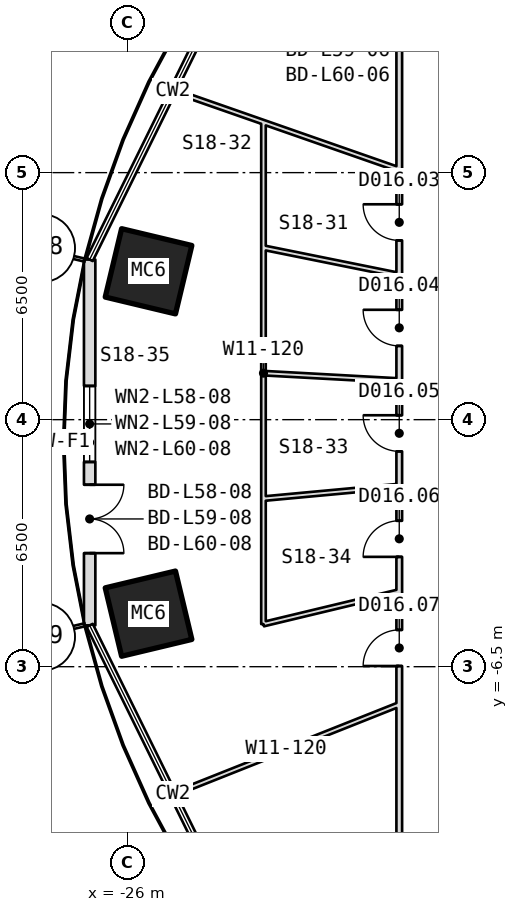
"""IFC4 building model, lengths in metres.
Left out: names, types, materials, properties, quantities, classifications, styles, units other than length and angle.
Written with IfcOpenShell. Run it as: python <this file> out.ifc"""

import sys

from ifc_helpers import new_model, si_unit, direction, frame, frame_2d, origin, origin_2d, place, context, subcontext, project, spatial, rectangle, hollow_rectangle, extrude, element, fill, save


model = new_model("IFC4")
c1 = context("Model", 3, precision=1e-05, world=origin(), true_north=direction((0.0, 1.0)))
c2 = subcontext(c1, "Body", "Model", "MODEL_VIEW")
j1 = project(units=[si_unit("LENGTHUNIT", "METRE"), si_unit("PLANEANGLEUNIT", "RADIAN")], contexts=[c1])
p1 = place(None, origin())
s1 = spatial("IfcSite", under=j1, at=p1, CompositionType="ELEMENT")
p2 = place(p1, origin())
s2 = spatial("IfcBuilding", under=s1, at=p2, CompositionType="ELEMENT")
p3 = place(p2, frame((0.0, 0.0, 260.65)))
s3 = spatial("IfcBuildingStorey", under=s2, at=p3, CompositionType="ELEMENT", Elevation=260.65)
for number, where, z_axis, x_axis in (
    (1, (-25.447, 3.904, -0.18), (0.0, 0.0, 1.0), (0.233, 0.973, 0.0)),
    (2, (-25.447, -5.104, -0.18), (0.0, 0.0, 1.0), (-0.233, 0.973, 0.0)),
):
    element("IfcColumn", number, at=place(p3, frame(where, z_axis=z_axis, x_axis=x_axis)), inside=s3, PredefinedType="COLUMN", context=c2, shape_type="SweptSolid", body=[
        extrude(hollow_rectangle(XDim=1.85, YDim=1.9, WallThickness=0.065, at=origin_2d()), origin(), (0.0, 0.0, 1.0), 4.15),
    ])
p4 = place(p3, frame((-26.997, 4.212, 0.0), z_axis=(0.0, 0.0, 1.0), x_axis=(0.0, -1.0, 0.0)))
e3 = element("IfcWall", 3, at=p4, inside=s3, PredefinedType="SOLIDWALL", context=c2, shape_type="SweptSolid", body=[
    extrude(rectangle(XDim=9.625, YDim=0.3, at=frame_2d((4.812, 0.0))), origin(), (0.0, 0.0, 1.0), 3.97),
])
p5 = place(p4, frame((5.925, 0.0, 0.0)))
e4 = element("IfcOpeningElement", 4, at=p5, cuts=e3, PredefinedType="OPENING", context=c2, shape_type="SweptSolid", body=[
    extrude(rectangle(XDim=1.8, YDim=2.4, at=frame_2d((0.9, 1.2))), frame((0.0, 0.16, 0.0), z_axis=(0.0, -1.0, 0.0), x_axis=(1.0, 0.0, 0.0)), (0.0, 0.0, 1.0), 0.32),
])
p6 = place(p4, frame((3.325, 0.0, 0.9)))
e5 = element("IfcOpeningElement", 5, at=p6, cuts=e3, PredefinedType="OPENING", context=c2, shape_type="SweptSolid", body=[
    extrude(rectangle(XDim=2.0, YDim=1.5, at=frame_2d((1.0, 0.75))), frame((0.0, 0.16, 0.0), z_axis=(0.0, -1.0, 0.0), x_axis=(1.0, 0.0, 0.0)), (0.0, 0.0, 1.0), 0.32),
])
p7 = place(p3, frame((-22.423, -5.379, 0.0), z_axis=(0.0, 0.0, 1.0), x_axis=(0.972404790941, 0.233300069769, 0.0)))
e6 = element("IfcWall", 6, at=p7, inside=s3, PredefinedType="PARTITIONING", context=c2, shape_type="SweptSolid", body=[
    extrude(rectangle(XDim=3.674, YDim=0.12, at=frame_2d((1.837, 0.0))), origin(), (0.0, 0.0, 1.0), 3.97),
])
p8 = place(p3, frame((-22.423, -2.078, 0.0), z_axis=(0.0, 0.0, 1.0), x_axis=(0.995734425091, 0.092265674486, 0.0)))
e7 = element("IfcWall", 7, at=p8, inside=s3, PredefinedType="PARTITIONING", context=c2, shape_type="SweptSolid", body=[
    extrude(rectangle(XDim=3.588, YDim=0.12, at=frame_2d((1.794, 0.0))), origin(), (0.0, 0.0, 1.0), 3.97),
])
p9 = place(p3, frame((-22.423, 1.224, 0.0), z_axis=(0.0, 0.0, 1.0), x_axis=(0.998512805401, -0.054517680164, 0.0)))
e8 = element("IfcWall", 8, at=p9, inside=s3, PredefinedType="PARTITIONING", context=c2, shape_type="SweptSolid", body=[
    extrude(rectangle(XDim=3.578, YDim=0.12, at=frame_2d((1.789, 0.0))), origin(), (0.0, 0.0, 1.0), 3.97),
])
p10 = place(p3, frame((-22.423, 4.526, 0.0), z_axis=(0.0, 0.0, 1.0), x_axis=(0.980228738347, -0.19786768437, 0.0)))
e9 = element("IfcWall", 9, at=p10, inside=s3, PredefinedType="PARTITIONING", context=c2, shape_type="SweptSolid", body=[
    extrude(rectangle(XDim=3.645, YDim=0.12, at=frame_2d((1.822, 0.0))), origin(), (0.0, 0.0, 1.0), 3.97),
])
p11 = place(p3, frame((-22.423, 7.827, 0.0), z_axis=(0.0, 0.0, 1.0), x_axis=(0.0, -1.0, 0.0)))
e10 = element("IfcWall", 10, at=p11, inside=s3, PredefinedType="PARTITIONING", context=c2, shape_type="SweptSolid", body=[
    extrude(rectangle(XDim=13.207, YDim=0.12, at=frame_2d((6.603, 0.0))), origin(), (0.0, 0.0, 1.0), 3.97),
])
p12 = place(p3, frame((-18.85, -16.15, 0.0), z_axis=(0.0, 0.0, 1.0), x_axis=(0.0, 1.0, 0.0)))
e11 = element("IfcWall", 11, at=p12, inside=s3, PredefinedType="PARTITIONING", context=c2, shape_type="SweptSolid", body=[
    extrude(rectangle(XDim=30.73, YDim=0.15, at=frame_2d((15.365, 0.0))), origin(), (0.0, 0.0, 1.0), 3.97),
])
p13 = place(p12, frame((20.867, 0.0, 0.0)))
e12 = element("IfcOpeningElement", 12, at=p13, cuts=e11, PredefinedType="OPENING", context=c2, shape_type="SweptSolid", body=[
    extrude(rectangle(XDim=0.95, YDim=2.1, at=frame_2d((0.475, 1.05))), frame((0.0, 0.085, 0.0), z_axis=(0.0, -1.0, 0.0), x_axis=(1.0, 0.0, 0.0)), (0.0, 0.0, 1.0), 0.17),
])
p14 = place(p12, frame((18.091, 0.0, 0.0)))
e13 = element("IfcOpeningElement", 13, at=p14, cuts=e11, PredefinedType="OPENING", context=c2, shape_type="SweptSolid", body=[
    extrude(rectangle(XDim=0.95, YDim=2.1, at=frame_2d((0.475, 1.05))), frame((0.0, 0.085, 0.0), z_axis=(0.0, -1.0, 0.0), x_axis=(1.0, 0.0, 0.0)), (0.0, 0.0, 1.0), 0.17),
])
p15 = place(p12, frame((15.316, 0.0, 0.0)))
e14 = element("IfcOpeningElement", 14, at=p15, cuts=e11, PredefinedType="OPENING", context=c2, shape_type="SweptSolid", body=[
    extrude(rectangle(XDim=0.95, YDim=2.1, at=frame_2d((0.475, 1.05))), frame((0.0, 0.085, 0.0), z_axis=(0.0, -1.0, 0.0), x_axis=(1.0, 0.0, 0.0)), (0.0, 0.0, 1.0), 0.17),
])
p16 = place(p12, frame((12.54, 0.0, 0.0)))
e15 = element("IfcOpeningElement", 15, at=p16, cuts=e11, PredefinedType="OPENING", context=c2, shape_type="SweptSolid", body=[
    extrude(rectangle(XDim=0.95, YDim=2.1, at=frame_2d((0.475, 1.05))), frame((0.0, 0.085, 0.0), z_axis=(0.0, -1.0, 0.0), x_axis=(1.0, 0.0, 0.0)), (0.0, 0.0, 1.0), 0.17),
])
p17 = place(p12, frame((9.668, 0.0, 0.0)))
e16 = element("IfcOpeningElement", 16, at=p17, cuts=e11, PredefinedType="OPENING", context=c2, shape_type="SweptSolid", body=[
    extrude(rectangle(XDim=0.95, YDim=2.1, at=frame_2d((0.475, 1.05))), frame((0.0, 0.085, 0.0), z_axis=(0.0, -1.0, 0.0), x_axis=(1.0, 0.0, 0.0)), (0.0, 0.0, 1.0), 0.17),
])
p18 = place(p3, frame((-18.85, -7.492, 0.0), z_axis=(0.0, 0.0, 1.0), x_axis=(-0.929289035648, -0.369353337908, 0.0)))
e17 = element("IfcWall", 17, at=p18, inside=s3, PredefinedType="PARTITIONING", context=c2, shape_type="SweptSolid", body=[
    extrude(rectangle(XDim=6.408, YDim=0.12, at=frame_2d((3.204, 0.0))), origin(), (0.0, 0.0, 1.0), 3.97),
])
p19 = place(p3, frame((-18.85, 6.58, 0.0), z_axis=(0.0, 0.0, 1.0), x_axis=(-0.944129608836, 0.329574394819, 0.0)))
e18 = element("IfcWall", 18, at=p19, inside=s3, PredefinedType="PARTITIONING", context=c2, shape_type="SweptSolid", body=[
    extrude(rectangle(XDim=6.307, YDim=0.12, at=frame_2d((3.153, 0.0))), origin(), (0.0, 0.0, 1.0), 3.97),
])
p20 = place(p5, origin())
e19 = element("IfcDoor", 19, at=p20, inside=s3, OperationType="SINGLE_SWING_LEFT", PredefinedType="DOOR", context=c2, shape_type="SweptSolid", body=[
    extrude(rectangle(XDim=1.8, YDim=2.4, at=frame_2d((0.9, 1.2))), frame((0.0, 0.025, 0.0), z_axis=(0.0, -1.0, 0.0), x_axis=(1.0, 0.0, 0.0)), (0.0, 0.0, 1.0), 0.05),
])
fill(e4, e19)
p21 = place(p6, origin())
e20 = element("IfcWindow", 20, at=p21, inside=s3, PartitioningType="SINGLE_PANEL", PredefinedType="WINDOW", context=c2, shape_type="SweptSolid", body=[
    extrude(rectangle(XDim=2.0, YDim=1.5, at=frame_2d((1.0, 0.75))), frame((0.0, 0.03, 0.0), z_axis=(0.0, -1.0, 0.0), x_axis=(1.0, 0.0, 0.0)), (0.0, 0.0, 1.0), 0.06),
])
fill(e5, e20)
p22 = place(p13, origin())
e21 = element("IfcDoor", 21, at=p22, inside=s3, OperationType="SINGLE_SWING_RIGHT", PredefinedType="DOOR", context=c2, shape_type="SweptSolid", body=[
    extrude(rectangle(XDim=0.95, YDim=2.1, at=frame_2d((0.475, 1.05))), frame((0.0, 0.025, 0.0), z_axis=(0.0, -1.0, 0.0), x_axis=(1.0, 0.0, 0.0)), (0.0, 0.0, 1.0), 0.05),
])
fill(e12, e21)
p23 = place(p14, origin())
e22 = element("IfcDoor", 22, at=p23, inside=s3, OperationType="SINGLE_SWING_RIGHT", PredefinedType="DOOR", context=c2, shape_type="SweptSolid", body=[
    extrude(rectangle(XDim=0.95, YDim=2.1, at=frame_2d((0.475, 1.05))), frame((0.0, 0.025, 0.0), z_axis=(0.0, -1.0, 0.0), x_axis=(1.0, 0.0, 0.0)), (0.0, 0.0, 1.0), 0.05),
])
fill(e13, e22)
p24 = place(p15, origin())
e23 = element("IfcDoor", 23, at=p24, inside=s3, OperationType="SINGLE_SWING_RIGHT", PredefinedType="DOOR", context=c2, shape_type="SweptSolid", body=[
    extrude(rectangle(XDim=0.95, YDim=2.1, at=frame_2d((0.475, 1.05))), frame((0.0, 0.025, 0.0), z_axis=(0.0, -1.0, 0.0), x_axis=(1.0, 0.0, 0.0)), (0.0, 0.0, 1.0), 0.05),
])
fill(e14, e23)
p25 = place(p16, origin())
e24 = element("IfcDoor", 24, at=p25, inside=s3, OperationType="SINGLE_SWING_RIGHT", PredefinedType="DOOR", context=c2, shape_type="SweptSolid", body=[
    extrude(rectangle(XDim=0.95, YDim=2.1, at=frame_2d((0.475, 1.05))), frame((0.0, 0.025, 0.0), z_axis=(0.0, -1.0, 0.0), x_axis=(1.0, 0.0, 0.0)), (0.0, 0.0, 1.0), 0.05),
])
fill(e15, e24)
p26 = place(p17, origin())
e25 = element("IfcDoor", 25, at=p26, inside=s3, OperationType="SINGLE_SWING_RIGHT", PredefinedType="DOOR", context=c2, shape_type="SweptSolid", body=[
    extrude(rectangle(XDim=0.95, YDim=2.1, at=frame_2d((0.475, 1.05))), frame((0.0, 0.025, 0.0), z_axis=(0.0, -1.0, 0.0), x_axis=(1.0, 0.0, 0.0)), (0.0, 0.0, 1.0), 0.05),
])
fill(e16, e25)
save(model, sys.argv[1])
